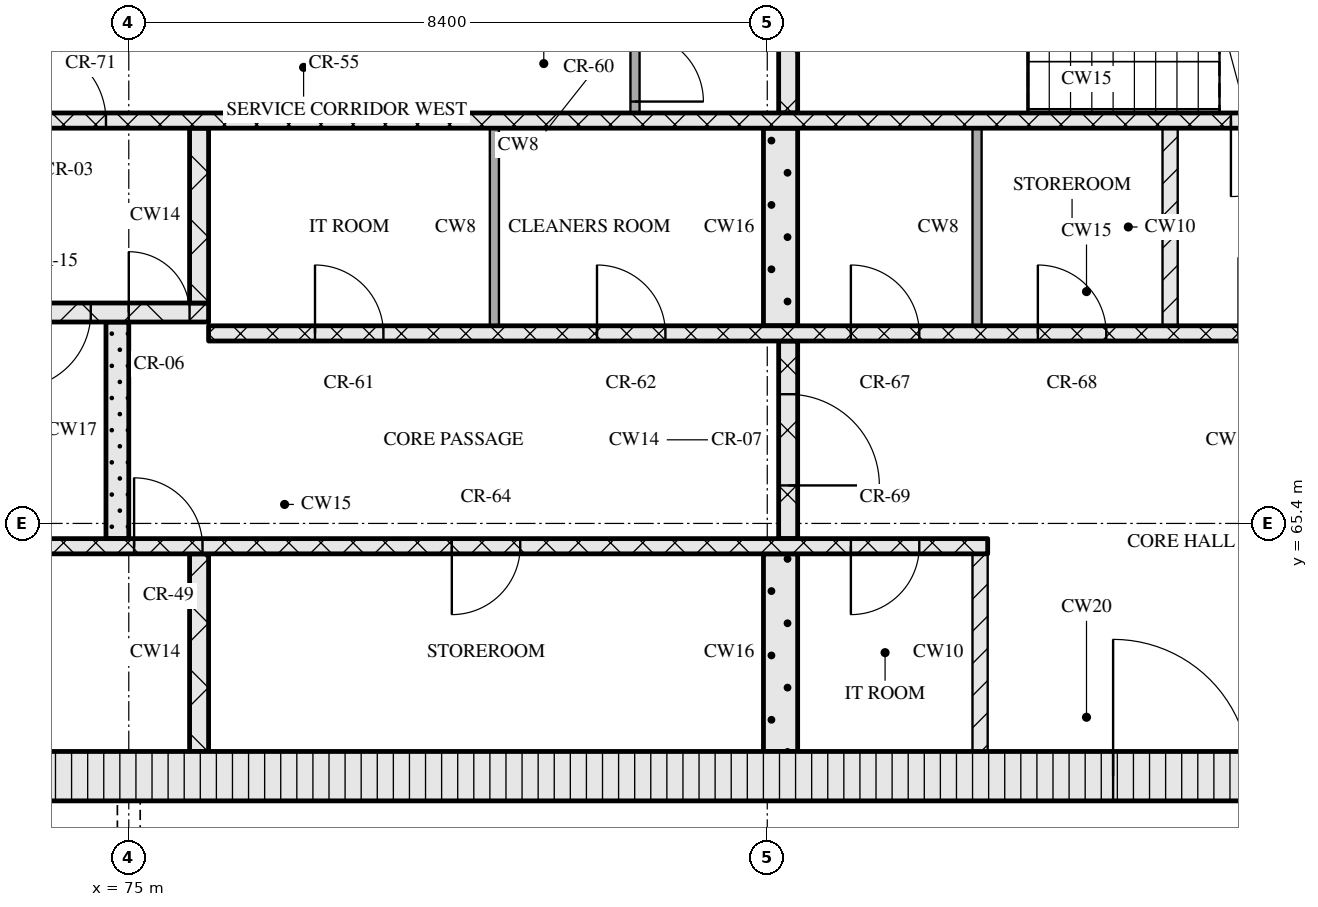
"""IFC4 building model, lengths in metres.
Left out: names, types, materials, properties, quantities, classifications, styles, units other than length and angle.
Written with IfcOpenShell. Run it as: python <this file> out.ifc"""

import sys

from ifc_helpers import new_model, si_unit, direction, frame, frame_2d, origin, place, context, subcontext, project, spatial, rectangle, extrude, element, fill, save


model = new_model("IFC4")
c1 = context("Model", 3, precision=1e-05, world=origin(), true_north=direction((0.0, 1.0)))
c2 = subcontext(c1, "Body", "Model", "MODEL_VIEW")
j1 = project(units=[si_unit("LENGTHUNIT", "METRE"), si_unit("PLANEANGLEUNIT", "RADIAN")], contexts=[c1])
p1 = place(None, origin())
s1 = spatial("IfcSite", under=j1, at=p1, CompositionType="ELEMENT")
p2 = place(p1, origin())
s2 = spatial("IfcBuilding", under=s1, at=p2, CompositionType="ELEMENT")
p3 = place(p2, frame((0.0, 0.0, 209.1)))
s3 = spatial("IfcBuildingStorey", under=s2, at=p3, CompositionType="ELEMENT", Elevation=209.1)
p4 = place(p3, frame((67.15, 62.075, 0.0), z_axis=(0.0, 0.0, 1.0), x_axis=(1.0, 0.0, 0.0)))
e1 = element("IfcWall", 1, at=p4, inside=s3, PredefinedType="SOLIDWALL", context=c2, shape_type="SweptSolid", body=[
    extrude(rectangle(XDim=40.9, YDim=0.65, at=frame_2d((20.45, 0.0))), origin(), (0.0, 0.0, 1.0), 3.32),
])
p5 = place(p4, frame((20.8, 0.0, 0.0)))
e2 = element("IfcOpeningElement", 2, at=p5, cuts=e1, PredefinedType="OPENING", context=c2, shape_type="SweptSolid", body=[
    extrude(rectangle(XDim=1.8, YDim=2.1, at=frame_2d((0.9, 1.05))), frame((0.0, 0.335, 0.0), z_axis=(0.0, -1.0, 0.0), x_axis=(1.0, 0.0, 0.0)), (0.0, 0.0, 1.0), 0.67),
])
p6 = place(p3, frame((75.925, 62.4, 0.0), z_axis=(0.0, 0.0, 1.0), x_axis=(0.0, 1.0, 0.0)))
e3 = element("IfcWall", 3, at=p6, inside=s3, PredefinedType="SOLIDWALL", context=c2, shape_type="SweptSolid", body=[
    extrude(rectangle(XDim=2.6, YDim=0.25, at=frame_2d((1.3, 0.0))), origin(), (0.0, 0.0, 1.0), 3.32),
])
p7 = place(p3, frame((83.575, 62.4, 0.0), z_axis=(0.0, 0.0, 1.0), x_axis=(0.0, 1.0, 0.0)))
e4 = element("IfcWall", 4, at=p7, inside=s3, PredefinedType="SOLIDWALL", context=c2, shape_type="SweptSolid", body=[
    extrude(rectangle(XDim=2.6, YDim=0.45, at=frame_2d((1.3, 0.0))), origin(), (0.0, 0.0, 1.0), 3.32),
])
p8 = place(p3, frame((86.2, 62.4, 0.0), z_axis=(0.0, 0.0, 1.0), x_axis=(0.0, 1.0, 0.0)))
e5 = element("IfcWall", 5, at=p8, inside=s3, PredefinedType="PARTITIONING", context=c2, shape_type="SweptSolid", body=[
    extrude(rectangle(XDim=2.6, YDim=0.2, at=frame_2d((1.3, 0.0))), origin(), (0.0, 0.0, 1.0), 3.32),
])
p9 = place(p3, frame((67.8, 65.1, 0.0), z_axis=(0.0, 0.0, 1.0), x_axis=(1.0, 0.0, 0.0)))
e6 = element("IfcWall", 6, at=p9, inside=s3, PredefinedType="SOLIDWALL", context=c2, shape_type="SweptSolid", body=[
    extrude(rectangle(XDim=18.5, YDim=0.2, at=frame_2d((9.25, 0.0))), origin(), (0.0, 0.0, 1.0), 3.32),
])
p10 = place(p9, frame((7.27, 0.0, 0.0)))
e7 = element("IfcOpeningElement", 7, at=p10, cuts=e6, PredefinedType="OPENING", context=c2, shape_type="SweptSolid", body=[
    extrude(rectangle(XDim=0.9, YDim=2.1, at=frame_2d((0.45, 1.05))), frame((0.0, 0.11, 0.0), z_axis=(0.0, -1.0, 0.0), x_axis=(1.0, 0.0, 0.0)), (0.0, 0.0, 1.0), 0.22),
])
p11 = place(p9, frame((11.45, 0.0, 0.0)))
e8 = element("IfcOpeningElement", 8, at=p11, cuts=e6, PredefinedType="OPENING", context=c2, shape_type="SweptSolid", body=[
    extrude(rectangle(XDim=0.9, YDim=2.1, at=frame_2d((0.45, 1.05))), frame((0.0, 0.11, 0.0), z_axis=(0.0, -1.0, 0.0), x_axis=(1.0, 0.0, 0.0)), (0.0, 0.0, 1.0), 0.22),
])
p12 = place(p9, frame((16.7, 0.0, 0.0)))
e9 = element("IfcOpeningElement", 9, at=p12, cuts=e6, PredefinedType="OPENING", context=c2, shape_type="SweptSolid", body=[
    extrude(rectangle(XDim=0.9, YDim=2.1, at=frame_2d((0.45, 1.05))), frame((0.0, 0.11, 0.0), z_axis=(0.0, -1.0, 0.0), x_axis=(1.0, 0.0, 0.0)), (0.0, 0.0, 1.0), 0.22),
])
p13 = place(p3, frame((74.85, 65.2, 0.0), z_axis=(0.0, 0.0, 1.0), x_axis=(0.0, 1.0, 0.0)))
e10 = element("IfcWall", 10, at=p13, inside=s3, PredefinedType="SOLIDWALL", context=c2, shape_type="SweptSolid", body=[
    extrude(rectangle(XDim=2.85, YDim=0.3, at=frame_2d((1.425, 0.0))), origin(), (0.0, 0.0, 1.0), 3.32),
])
p14 = place(p3, frame((83.675, 65.2, 0.0), z_axis=(0.0, 0.0, 1.0), x_axis=(0.0, 1.0, 0.0)))
e11 = element("IfcWall", 11, at=p14, inside=s3, PredefinedType="SOLIDWALL", context=c2, shape_type="SweptSolid", body=[
    extrude(rectangle(XDim=2.6, YDim=0.25, at=frame_2d((1.3, 0.0))), origin(), (0.0, 0.0, 1.0), 3.32),
])
p15 = place(p14, frame((0.7, 0.0, 0.0)))
e12 = element("IfcOpeningElement", 12, at=p15, cuts=e11, PredefinedType="OPENING", context=c2, shape_type="SweptSolid", body=[
    extrude(rectangle(XDim=1.2, YDim=2.1, at=frame_2d((0.6, 1.05))), frame((0.0, 0.135, 0.0), z_axis=(0.0, -1.0, 0.0), x_axis=(1.0, 0.0, 0.0)), (0.0, 0.0, 1.0), 0.27),
])
p16 = place(p3, frame((76.05, 67.9, 0.0), z_axis=(0.0, 0.0, 1.0), x_axis=(1.0, 0.0, 0.0)))
e13 = element("IfcWall", 13, at=p16, inside=s3, PredefinedType="SOLIDWALL", context=c2, shape_type="SweptSolid", body=[
    extrude(rectangle(XDim=23.1, YDim=0.2, at=frame_2d((11.55, 0.0))), origin(), (0.0, 0.0, 1.0), 3.32),
])
p17 = place(p16, frame((1.4, 0.0, 0.0)))
e14 = element("IfcOpeningElement", 14, at=p17, cuts=e13, PredefinedType="OPENING", context=c2, shape_type="SweptSolid", body=[
    extrude(rectangle(XDim=0.9, YDim=2.1, at=frame_2d((0.45, 1.05))), frame((0.0, 0.11, 0.0), z_axis=(0.0, -1.0, 0.0), x_axis=(1.0, 0.0, 0.0)), (0.0, 0.0, 1.0), 0.22),
])
p18 = place(p16, frame((5.11, 0.0, 0.0)))
e15 = element("IfcOpeningElement", 15, at=p18, cuts=e13, PredefinedType="OPENING", context=c2, shape_type="SweptSolid", body=[
    extrude(rectangle(XDim=0.9, YDim=2.1, at=frame_2d((0.45, 1.05))), frame((0.0, 0.11, 0.0), z_axis=(0.0, -1.0, 0.0), x_axis=(1.0, 0.0, 0.0)), (0.0, 0.0, 1.0), 0.22),
])
p19 = place(p16, frame((8.45, 0.0, 0.0)))
e16 = element("IfcOpeningElement", 16, at=p19, cuts=e13, PredefinedType="OPENING", context=c2, shape_type="SweptSolid", body=[
    extrude(rectangle(XDim=0.9, YDim=2.1, at=frame_2d((0.45, 1.05))), frame((0.0, 0.11, 0.0), z_axis=(0.0, -1.0, 0.0), x_axis=(1.0, 0.0, 0.0)), (0.0, 0.0, 1.0), 0.22),
])
p20 = place(p16, frame((10.91, 0.0, 0.0)))
e17 = element("IfcOpeningElement", 17, at=p20, cuts=e13, PredefinedType="OPENING", context=c2, shape_type="SweptSolid", body=[
    extrude(rectangle(XDim=0.9, YDim=2.1, at=frame_2d((0.45, 1.05))), frame((0.0, 0.11, 0.0), z_axis=(0.0, -1.0, 0.0), x_axis=(1.0, 0.0, 0.0)), (0.0, 0.0, 1.0), 0.22),
])
p21 = place(p16, frame((13.55, 0.0, 0.0)))
e18 = element("IfcOpeningElement", 18, at=p21, cuts=e13, PredefinedType="OPENING", context=c2, shape_type="SweptSolid", body=[
    extrude(rectangle(XDim=1.0, YDim=2.1, at=frame_2d((0.5, 1.05))), frame((0.0, 0.11, 0.0), z_axis=(0.0, -1.0, 0.0), x_axis=(1.0, 0.0, 0.0)), (0.0, 0.0, 1.0), 0.22),
])
p22 = place(p16, frame((16.2, 0.0, 0.0)))
e19 = element("IfcOpeningElement", 19, at=p22, cuts=e13, PredefinedType="OPENING", context=c2, shape_type="SweptSolid", body=[
    extrude(rectangle(XDim=1.1, YDim=2.1, at=frame_2d((0.55, 1.05))), frame((0.0, 0.11, 0.0), z_axis=(0.0, -1.0, 0.0), x_axis=(1.0, 0.0, 0.0)), (0.0, 0.0, 1.0), 0.22),
])
p23 = place(p16, frame((18.7, 0.0, 0.0)))
e20 = element("IfcOpeningElement", 20, at=p23, cuts=e13, PredefinedType="OPENING", context=c2, shape_type="SweptSolid", body=[
    extrude(rectangle(XDim=1.1, YDim=2.1, at=frame_2d((0.55, 1.05))), frame((0.0, 0.11, 0.0), z_axis=(0.0, -1.0, 0.0), x_axis=(1.0, 0.0, 0.0)), (0.0, 0.0, 1.0), 0.22),
])
p24 = place(p16, frame((21.2, 0.0, 0.0)))
e21 = element("IfcOpeningElement", 21, at=p24, cuts=e13, PredefinedType="OPENING", context=c2, shape_type="SweptSolid", body=[
    extrude(rectangle(XDim=1.1, YDim=2.1, at=frame_2d((0.55, 1.05))), frame((0.0, 0.11, 0.0), z_axis=(0.0, -1.0, 0.0), x_axis=(1.0, 0.0, 0.0)), (0.0, 0.0, 1.0), 0.22),
])
p25 = place(p3, frame((79.81, 68.0, 0.0), z_axis=(0.0, 0.0, 1.0), x_axis=(0.0, 1.0, 0.0)))
e22 = element("IfcWall", 22, at=p25, inside=s3, PredefinedType="PARTITIONING", context=c2, shape_type="SweptSolid", body=[
    extrude(rectangle(XDim=2.6, YDim=0.12, at=frame_2d((1.3, 0.0))), origin(), (0.0, 0.0, 1.0), 3.32),
])
p26 = place(p3, frame((83.575, 68.0, 0.0), z_axis=(0.0, 0.0, 1.0), x_axis=(0.0, 1.0, 0.0)))
e23 = element("IfcWall", 23, at=p26, inside=s3, PredefinedType="SOLIDWALL", context=c2, shape_type="SweptSolid", body=[
    extrude(rectangle(XDim=2.6, YDim=0.45, at=frame_2d((1.3, 0.0))), origin(), (0.0, 0.0, 1.0), 3.32),
])
p27 = place(p3, frame((86.16, 68.0, 0.0), z_axis=(0.0, 0.0, 1.0), x_axis=(0.0, 1.0, 0.0)))
e24 = element("IfcWall", 24, at=p27, inside=s3, PredefinedType="PARTITIONING", context=c2, shape_type="SweptSolid", body=[
    extrude(rectangle(XDim=2.6, YDim=0.12, at=frame_2d((1.3, 0.0))), origin(), (0.0, 0.0, 1.0), 3.32),
])
p28 = place(p3, frame((88.7, 68.0, 0.0), z_axis=(0.0, 0.0, 1.0), x_axis=(0.0, 1.0, 0.0)))
e25 = element("IfcWall", 25, at=p28, inside=s3, PredefinedType="PARTITIONING", context=c2, shape_type="SweptSolid", body=[
    extrude(rectangle(XDim=2.6, YDim=0.2, at=frame_2d((1.3, 0.0))), origin(), (0.0, 0.0, 1.0), 3.32),
])
p29 = place(p3, frame((67.8, 68.175, 0.0), z_axis=(0.0, 0.0, 1.0), x_axis=(1.0, 0.0, 0.0)))
e26 = element("IfcWall", 26, at=p29, inside=s3, PredefinedType="SOLIDWALL", context=c2, shape_type="SweptSolid", body=[
    extrude(rectangle(XDim=8.25, YDim=0.25, at=frame_2d((4.125, 0.0))), origin(), (0.0, 0.0, 1.0), 3.32),
])
p30 = place(p29, frame((5.7, 0.0, 0.0)))
e27 = element("IfcOpeningElement", 27, at=p30, cuts=e26, PredefinedType="OPENING", context=c2, shape_type="SweptSolid", body=[
    extrude(rectangle(XDim=1.0, YDim=2.1, at=frame_2d((0.5, 1.05))), frame((0.0, 0.135, 0.0), z_axis=(0.0, -1.0, 0.0), x_axis=(1.0, 0.0, 0.0)), (0.0, 0.0, 1.0), 0.27),
])
p31 = place(p29, frame((7.2, 0.0, 0.0)))
e28 = element("IfcOpeningElement", 28, at=p31, cuts=e26, PredefinedType="OPENING", context=c2, shape_type="SweptSolid", body=[
    extrude(rectangle(XDim=0.8, YDim=2.1, at=frame_2d((0.4, 1.05))), frame((0.0, 0.135, 0.0), z_axis=(0.0, -1.0, 0.0), x_axis=(1.0, 0.0, 0.0)), (0.0, 0.0, 1.0), 0.27),
])
p32 = place(p3, frame((75.925, 68.3, 0.0), z_axis=(0.0, 0.0, 1.0), x_axis=(0.0, 1.0, 0.0)))
e29 = element("IfcWall", 29, at=p32, inside=s3, PredefinedType="SOLIDWALL", context=c2, shape_type="SweptSolid", body=[
    extrude(rectangle(XDim=2.3, YDim=0.25, at=frame_2d((1.15, 0.0))), origin(), (0.0, 0.0, 1.0), 3.32),
])
p33 = place(p3, frame((67.8, 70.7, 0.0), z_axis=(0.0, 0.0, 1.0), x_axis=(1.0, 0.0, 0.0)))
e30 = element("IfcWall", 30, at=p33, inside=s3, PredefinedType="SOLIDWALL", context=c2, shape_type="SweptSolid", body=[
    extrude(rectangle(XDim=39.6, YDim=0.2, at=frame_2d((19.8, 0.0))), origin(), (0.0, 0.0, 1.0), 3.32),
])
p34 = place(p33, frame((0.65, 0.0, 0.0)))
e31 = element("IfcOpeningElement", 31, at=p34, cuts=e30, PredefinedType="OPENING", context=c2, shape_type="SweptSolid", body=[
    extrude(rectangle(XDim=1.1, YDim=2.1, at=frame_2d((0.55, 1.05))), frame((0.0, 0.11, 0.0), z_axis=(0.0, -1.0, 0.0), x_axis=(1.0, 0.0, 0.0)), (0.0, 0.0, 1.0), 0.22),
])
p35 = place(p33, frame((3.25, 0.0, 0.0)))
e32 = element("IfcOpeningElement", 32, at=p35, cuts=e30, PredefinedType="OPENING", context=c2, shape_type="SweptSolid", body=[
    extrude(rectangle(XDim=1.1, YDim=2.1, at=frame_2d((0.55, 1.05))), frame((0.0, 0.11, 0.0), z_axis=(0.0, -1.0, 0.0), x_axis=(1.0, 0.0, 0.0)), (0.0, 0.0, 1.0), 0.22),
])
p36 = place(p33, frame((5.9, 0.0, 0.0)))
e33 = element("IfcOpeningElement", 33, at=p36, cuts=e30, PredefinedType="OPENING", context=c2, shape_type="SweptSolid", body=[
    extrude(rectangle(XDim=1.0, YDim=2.1, at=frame_2d((0.5, 1.05))), frame((0.0, 0.11, 0.0), z_axis=(0.0, -1.0, 0.0), x_axis=(1.0, 0.0, 0.0)), (0.0, 0.0, 1.0), 0.22),
])
p37 = place(p33, frame((21.7, 0.0, 0.0)))
e34 = element("IfcOpeningElement", 34, at=p37, cuts=e30, PredefinedType="OPENING", context=c2, shape_type="SweptSolid", body=[
    extrude(rectangle(XDim=1.0, YDim=2.1, at=frame_2d((0.5, 1.05))), frame((0.0, 0.11, 0.0), z_axis=(0.0, -1.0, 0.0), x_axis=(1.0, 0.0, 0.0)), (0.0, 0.0, 1.0), 0.22),
])
p38 = place(p33, frame((32.7, 0.0, 0.0)))
e35 = element("IfcOpeningElement", 35, at=p38, cuts=e30, PredefinedType="OPENING", context=c2, shape_type="SweptSolid", body=[
    extrude(rectangle(XDim=1.0, YDim=2.1, at=frame_2d((0.5, 1.05))), frame((0.0, 0.11, 0.0), z_axis=(0.0, -1.0, 0.0), x_axis=(1.0, 0.0, 0.0)), (0.0, 0.0, 1.0), 0.22),
])
p39 = place(p33, frame((35.25, 0.0, 0.0)))
e36 = element("IfcOpeningElement", 36, at=p39, cuts=e30, PredefinedType="OPENING", context=c2, shape_type="SweptSolid", body=[
    extrude(rectangle(XDim=1.1, YDim=2.1, at=frame_2d((0.55, 1.05))), frame((0.0, 0.11, 0.0), z_axis=(0.0, -1.0, 0.0), x_axis=(1.0, 0.0, 0.0)), (0.0, 0.0, 1.0), 0.22),
])
p40 = place(p33, frame((37.85, 0.0, 0.0)))
e37 = element("IfcOpeningElement", 37, at=p40, cuts=e30, PredefinedType="OPENING", context=c2, shape_type="SweptSolid", body=[
    extrude(rectangle(XDim=1.1, YDim=2.1, at=frame_2d((0.55, 1.05))), frame((0.0, 0.11, 0.0), z_axis=(0.0, -1.0, 0.0), x_axis=(1.0, 0.0, 0.0)), (0.0, 0.0, 1.0), 0.22),
])
p41 = place(p3, frame((81.66, 70.8, 0.0), z_axis=(0.0, 0.0, 1.0), x_axis=(0.0, 1.0, 0.0)))
e38 = element("IfcWall", 38, at=p41, inside=s3, PredefinedType="PARTITIONING", context=c2, shape_type="SweptSolid", body=[
    extrude(rectangle(XDim=1.2, YDim=0.12, at=frame_2d((0.6, 0.0))), origin(), (0.0, 0.0, 1.0), 3.32),
])
p42 = place(p41, frame((0.15, 0.0, 0.0)))
e39 = element("IfcOpeningElement", 39, at=p42, cuts=e38, PredefinedType="OPENING", context=c2, shape_type="SweptSolid", body=[
    extrude(rectangle(XDim=0.9, YDim=2.1, at=frame_2d((0.45, 1.05))), frame((0.0, 0.07, 0.0), z_axis=(0.0, -1.0, 0.0), x_axis=(1.0, 0.0, 0.0)), (0.0, 0.0, 1.0), 0.14),
])
p43 = place(p3, frame((83.675, 70.8, 0.0), z_axis=(0.0, 0.0, 1.0), x_axis=(0.0, 1.0, 0.0)))
e40 = element("IfcWall", 40, at=p43, inside=s3, PredefinedType="SOLIDWALL", context=c2, shape_type="SweptSolid", body=[
    extrude(rectangle(XDim=2.95, YDim=0.25, at=frame_2d((1.475, 0.0))), origin(), (0.0, 0.0, 1.0), 3.32),
])
p44 = place(p5, origin())
e41 = element("IfcDoor", 41, at=p44, inside=s3, OperationType="DOUBLE_DOOR_SINGLE_SWING", PredefinedType="DOOR", context=c2, shape_type="SweptSolid", body=[
    extrude(rectangle(XDim=1.8, YDim=2.1, at=frame_2d((0.9, 1.05))), frame((0.0, 0.025, 0.0), z_axis=(0.0, -1.0, 0.0), x_axis=(1.0, 0.0, 0.0)), (0.0, 0.0, 1.0), 0.05),
])
fill(e2, e41)
p45 = place(p10, origin())
e42 = element("IfcDoor", 42, at=p45, inside=s3, OperationType="SINGLE_SWING_LEFT", PredefinedType="DOOR", context=c2, shape_type="SweptSolid", body=[
    extrude(rectangle(XDim=0.9, YDim=2.1, at=frame_2d((0.45, 1.05))), frame((0.0, 0.025, 0.0), z_axis=(0.0, -1.0, 0.0), x_axis=(1.0, 0.0, 0.0)), (0.0, 0.0, 1.0), 0.05),
])
fill(e7, e42)
p46 = place(p11, origin())
e43 = element("IfcDoor", 43, at=p46, inside=s3, OperationType="SINGLE_SWING_RIGHT", PredefinedType="DOOR", context=c2, shape_type="SweptSolid", body=[
    extrude(rectangle(XDim=0.9, YDim=2.1, at=frame_2d((0.45, 1.05))), frame((0.0, 0.025, 0.0), z_axis=(0.0, -1.0, 0.0), x_axis=(1.0, 0.0, 0.0)), (0.0, 0.0, 1.0), 0.05),
])
fill(e8, e43)
p47 = place(p12, origin())
e44 = element("IfcDoor", 44, at=p47, inside=s3, OperationType="SINGLE_SWING_RIGHT", PredefinedType="DOOR", context=c2, shape_type="SweptSolid", body=[
    extrude(rectangle(XDim=0.9, YDim=2.1, at=frame_2d((0.45, 1.05))), frame((0.0, 0.025, 0.0), z_axis=(0.0, -1.0, 0.0), x_axis=(1.0, 0.0, 0.0)), (0.0, 0.0, 1.0), 0.05),
])
fill(e9, e44)
p48 = place(p15, origin())
e45 = element("IfcDoor", 45, at=p48, inside=s3, OperationType="SINGLE_SWING_RIGHT", PredefinedType="DOOR", context=c2, shape_type="SweptSolid", body=[
    extrude(rectangle(XDim=1.2, YDim=2.1, at=frame_2d((0.6, 1.05))), frame((0.0, 0.025, 0.0), z_axis=(0.0, -1.0, 0.0), x_axis=(1.0, 0.0, 0.0)), (0.0, 0.0, 1.0), 0.05),
])
fill(e12, e45)
p49 = place(p17, origin())
e46 = element("IfcDoor", 46, at=p49, inside=s3, OperationType="SINGLE_SWING_LEFT", PredefinedType="DOOR", context=c2, shape_type="SweptSolid", body=[
    extrude(rectangle(XDim=0.9, YDim=2.1, at=frame_2d((0.45, 1.05))), frame((0.0, 0.025, 0.0), z_axis=(0.0, -1.0, 0.0), x_axis=(1.0, 0.0, 0.0)), (0.0, 0.0, 1.0), 0.05),
])
fill(e14, e46)
p50 = place(p18, origin())
e47 = element("IfcDoor", 47, at=p50, inside=s3, OperationType="SINGLE_SWING_LEFT", PredefinedType="DOOR", context=c2, shape_type="SweptSolid", body=[
    extrude(rectangle(XDim=0.9, YDim=2.1, at=frame_2d((0.45, 1.05))), frame((0.0, 0.025, 0.0), z_axis=(0.0, -1.0, 0.0), x_axis=(1.0, 0.0, 0.0)), (0.0, 0.0, 1.0), 0.05),
])
fill(e15, e47)
p51 = place(p19, origin())
e48 = element("IfcDoor", 48, at=p51, inside=s3, OperationType="SINGLE_SWING_LEFT", PredefinedType="DOOR", context=c2, shape_type="SweptSolid", body=[
    extrude(rectangle(XDim=0.9, YDim=2.1, at=frame_2d((0.45, 1.05))), frame((0.0, 0.025, 0.0), z_axis=(0.0, -1.0, 0.0), x_axis=(1.0, 0.0, 0.0)), (0.0, 0.0, 1.0), 0.05),
])
fill(e16, e48)
p52 = place(p20, origin())
e49 = element("IfcDoor", 49, at=p52, inside=s3, OperationType="SINGLE_SWING_LEFT", PredefinedType="DOOR", context=c2, shape_type="SweptSolid", body=[
    extrude(rectangle(XDim=0.9, YDim=2.1, at=frame_2d((0.45, 1.05))), frame((0.0, 0.025, 0.0), z_axis=(0.0, -1.0, 0.0), x_axis=(1.0, 0.0, 0.0)), (0.0, 0.0, 1.0), 0.05),
])
fill(e17, e49)
p53 = place(p30, origin())
e50 = element("IfcDoor", 50, at=p53, inside=s3, OperationType="SINGLE_SWING_RIGHT", PredefinedType="DOOR", context=c2, shape_type="SweptSolid", body=[
    extrude(rectangle(XDim=1.0, YDim=2.1, at=frame_2d((0.5, 1.05))), frame((0.0, 0.025, 0.0), z_axis=(0.0, -1.0, 0.0), x_axis=(1.0, 0.0, 0.0)), (0.0, 0.0, 1.0), 0.05),
])
fill(e27, e50)
p54 = place(p31, origin())
e51 = element("IfcDoor", 51, at=p54, inside=s3, OperationType="SINGLE_SWING_LEFT", PredefinedType="DOOR", context=c2, shape_type="SweptSolid", body=[
    extrude(rectangle(XDim=0.8, YDim=2.1, at=frame_2d((0.4, 1.05))), frame((0.0, 0.025, 0.0), z_axis=(0.0, -1.0, 0.0), x_axis=(1.0, 0.0, 0.0)), (0.0, 0.0, 1.0), 0.05),
])
fill(e28, e51)
p55 = place(p36, origin())
e52 = element("IfcDoor", 52, at=p55, inside=s3, OperationType="SINGLE_SWING_LEFT", PredefinedType="DOOR", context=c2, shape_type="SweptSolid", body=[
    extrude(rectangle(XDim=1.0, YDim=2.1, at=frame_2d((0.5, 1.05))), frame((0.0, 0.025, 0.0), z_axis=(0.0, -1.0, 0.0), x_axis=(1.0, 0.0, 0.0)), (0.0, 0.0, 1.0), 0.05),
])
fill(e33, e52)
p56 = place(p37, origin())
e53 = element("IfcDoor", 53, at=p56, inside=s3, OperationType="SINGLE_SWING_RIGHT", PredefinedType="DOOR", context=c2, shape_type="SweptSolid", body=[
    extrude(rectangle(XDim=1.0, YDim=2.1, at=frame_2d((0.5, 1.05))), frame((0.0, 0.025, 0.0), z_axis=(0.0, -1.0, 0.0), x_axis=(1.0, 0.0, 0.0)), (0.0, 0.0, 1.0), 0.05),
])
fill(e34, e53)
p57 = place(p42, origin())
e54 = element("IfcDoor", 54, at=p57, inside=s3, OperationType="SINGLE_SWING_RIGHT", PredefinedType="DOOR", context=c2, shape_type="SweptSolid", body=[
    extrude(rectangle(XDim=0.9, YDim=2.1, at=frame_2d((0.45, 1.05))), frame((0.0, 0.025, 0.0), z_axis=(0.0, -1.0, 0.0), x_axis=(1.0, 0.0, 0.0)), (0.0, 0.0, 1.0), 0.05),
])
fill(e39, e54)
save(model, sys.argv[1])
